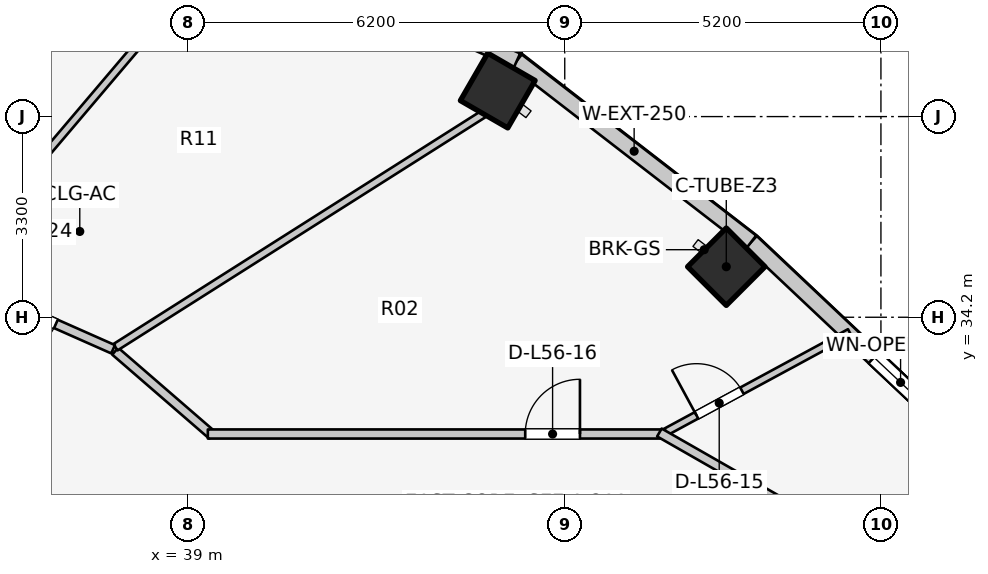
"""IFC4 building model, lengths in metres.
Left out: names, types, materials, properties, quantities, classifications, styles, units other than length and angle.
Written with IfcOpenShell. Run it as: python <this file> out.ifc"""

import sys

from ifc_helpers import new_model, si_unit, direction, frame, frame_2d, origin, origin_2d, place, context, subcontext, project, spatial, rectangle, extrude, element, fill, save


model = new_model("IFC4")
c1 = context("Model", 3, precision=1e-05, world=origin(), true_north=direction((0.0, 1.0)))
c2 = subcontext(c1, "Body", "Model", "MODEL_VIEW")
j1 = project(units=[si_unit("LENGTHUNIT", "METRE"), si_unit("PLANEANGLEUNIT", "RADIAN")], contexts=[c1])
p1 = place(None, origin())
s1 = spatial("IfcSite", under=j1, at=p1, CompositionType="ELEMENT")
p2 = place(p1, origin())
s2 = spatial("IfcBuilding", under=s1, at=p2, CompositionType="ELEMENT")
p3 = place(p2, frame((0.0, 0.0, 183.9)))
s3 = spatial("IfcBuildingStorey", under=s2, at=p3, CompositionType="ELEMENT", Elevation=183.9)
for number, where, z_axis, x_axis in (
    (1, (47.857, 35.031, 0.0), (0.0, 0.0, 1.0), (0.707, 0.707, 0.0)),
    (2, (44.098, 37.928, 0.0), (0.0, 0.0, 1.0), (0.5, 0.866, 0.0)),
):
    element("IfcColumn", number, at=place(p3, frame(where, z_axis=z_axis, x_axis=x_axis)), inside=s3, PredefinedType="COLUMN", context=c2, shape_type="SweptSolid", body=[
        extrude(rectangle(XDim=0.9, YDim=0.9, at=origin_2d()), origin(), (0.0, 0.0, 1.0), 3.1),
    ])
p4 = place(p3, frame((51.619, 32.284, 0.0), z_axis=(0.0, 0.0, 1.0), x_axis=(-0.727667301037, 0.68593024354, 0.0)))
e3 = element("IfcWall", 3, at=p4, inside=s3, PredefinedType="STANDARD", context=c2, shape_type="SweptSolid", body=[
    extrude(rectangle(XDim=4.604, YDim=0.26, at=frame_2d((2.302, 0.0))), origin(), (0.0, 0.0, 1.0), 2.85),
])
p5 = place(p4, frame((0.631, 0.0, 0.75)))
e4 = element("IfcOpeningElement", 4, at=p5, cuts=e3, PredefinedType="OPENING", context=c2, shape_type="SweptSolid", body=[
    extrude(rectangle(XDim=1.2, YDim=1.5, at=frame_2d((0.6, 0.75))), frame((0.0, 0.14, 0.0), z_axis=(0.0, -1.0, 0.0), x_axis=(1.0, 0.0, 0.0)), (0.0, 0.0, 1.0), 0.28),
])
p6 = place(p3, frame((48.269, 35.441, 0.0), z_axis=(0.0, 0.0, 1.0), x_axis=(-0.791460185804, 0.611220724687, 0.0)))
e5 = element("IfcWall", 5, at=p6, inside=s3, PredefinedType="STANDARD", context=c2, shape_type="SweptSolid", body=[
    extrude(rectangle(XDim=4.872, YDim=0.26, at=frame_2d((2.436, 0.0))), origin(), (0.0, 0.0, 1.0), 2.85),
])
p7 = place(p3, frame((44.413, 38.419, 0.0), z_axis=(0.0, 0.0, 1.0), x_axis=(-0.912353637112, 0.409403029847, 0.0)))
e6 = element("IfcWall", 6, at=p7, inside=s3, PredefinedType="STANDARD", context=c2, shape_type="SweptSolid", body=[
    extrude(rectangle(XDim=5.533, YDim=0.26, at=frame_2d((2.766, 0.0))), origin(), (0.0, 0.0, 1.0), 2.88),
])
p8 = place(p7, frame((2.167, 0.0, 0.0)))
e7 = element("IfcOpeningElement", 7, at=p8, cuts=e6, PredefinedType="OPENING", context=c2, shape_type="SweptSolid", body=[
    extrude(rectangle(XDim=1.2, YDim=2.2, at=frame_2d((0.6, 1.1))), frame((0.0, 0.14, 0.0), z_axis=(0.0, -1.0, 0.0), x_axis=(1.0, 0.0, 0.0)), (0.0, 0.0, 1.0), 0.28),
])
p9 = place(p3, frame((46.756, 32.256, 0.0), z_axis=(0.0, 0.0, 1.0), x_axis=(0.879385297668, 0.476110804587, 0.0)))
e8 = element("IfcWall", 8, at=p9, inside=s3, PredefinedType="MOVABLE", context=c2, shape_type="SweptSolid", body=[
    extrude(rectangle(XDim=3.56, YDim=0.12, at=frame_2d((1.78, 0.0))), origin(), (0.0, 0.0, 1.0), 2.22),
])
p10 = place(p9, frame((0.694, 0.0, 0.0)))
e9 = element("IfcOpeningElement", 9, at=p10, cuts=e8, PredefinedType="OPENING", context=c2, shape_type="SweptSolid", body=[
    extrude(rectangle(XDim=0.85, YDim=2.05, at=frame_2d((0.425, 1.025))), frame((0.0, 0.07, 0.0), z_axis=(0.0, -1.0, 0.0), x_axis=(1.0, 0.0, 0.0)), (0.0, 0.0, 1.0), 0.14),
])
p11 = place(p3, frame((37.807, 33.642, 0.0), z_axis=(0.0, 0.0, 1.0), x_axis=(0.756055312247, -0.654507727092, 0.0)))
e10 = element("IfcWall", 10, at=p11, inside=s3, PredefinedType="PARTITIONING", context=c2, shape_type="SweptSolid", body=[
    extrude(rectangle(XDim=2.111, YDim=0.15, at=frame_2d((1.055, 0.0))), origin(), (0.0, 0.0, 1.0), 2.299),
])
p12 = place(p3, frame((39.33, 32.28, 0.0), z_axis=(0.0, 0.0, 1.0), x_axis=(1.0, 0.0, 0.0)))
e11 = element("IfcWall", 11, at=p12, inside=s3, PredefinedType="PARTITIONING", context=c2, shape_type="SweptSolid", body=[
    extrude(rectangle(XDim=7.52, YDim=0.15, at=frame_2d((3.76, 0.0))), origin(), (0.0, 0.0, 1.0), 2.299),
])
p13 = place(p12, frame((5.22, 0.0, 0.0)))
e12 = element("IfcOpeningElement", 12, at=p13, cuts=e11, PredefinedType="OPENING", context=c2, shape_type="SweptSolid", body=[
    extrude(rectangle(XDim=0.9, YDim=2.1, at=frame_2d((0.45, 1.05))), frame((0.0, 0.085, 0.0), z_axis=(0.0, -1.0, 0.0), x_axis=(1.0, 0.0, 0.0)), (0.0, 0.0, 1.0), 0.17),
])
p14 = place(p3, frame((46.757, 32.305, 0.0), z_axis=(0.0, 0.0, 1.0), x_axis=(0.867991349648, -0.496579315857, 0.0)))
e13 = element("IfcWall", 13, at=p14, inside=s3, PredefinedType="PARTITIONING", context=c2, shape_type="SweptSolid", body=[
    extrude(rectangle(XDim=2.567, YDim=0.15, at=frame_2d((1.283, 0.0))), origin(), (0.0, 0.0, 1.0), 2.22),
])
p15 = place(p3, frame((37.812, 33.708, 0.0), z_axis=(0.0, 0.0, 1.0), x_axis=(0.844640430122, 0.535334048799, 0.0)))
e14 = element("IfcWall", 14, at=p15, inside=s3, PredefinedType="PARTITIONING", context=c2, shape_type="SweptSolid", body=[
    extrude(rectangle(XDim=7.188, YDim=0.125, at=frame_2d((3.594, 0.0))), origin(), (0.0, 0.0, 1.0), 2.299),
])
p16 = place(p3, frame((35.02, 34.952, 0.0), z_axis=(0.0, 0.0, 1.0), x_axis=(0.647173462792, 0.762342776615, 0.0)))
e15 = element("IfcWall", 15, at=p16, inside=s3, PredefinedType="PARTITIONING", context=c2, shape_type="SweptSolid", body=[
    extrude(rectangle(XDim=6.253, YDim=0.125, at=frame_2d((3.127, 0.0))), origin(), (0.0, 0.0, 1.0), 2.299),
])
p17 = place(p3, frame((37.772, 33.674, 0.0), z_axis=(0.0, 0.0, 1.0), x_axis=(-0.914324470734, 0.404982422108, 0.0)))
e16 = element("IfcWall", 16, at=p17, inside=s3, PredefinedType="PARTITIONING", context=c2, shape_type="SweptSolid", body=[
    extrude(rectangle(XDim=3.058, YDim=0.15, at=frame_2d((1.529, 0.0))), origin(), (0.0, 0.0, 1.0), 2.299),
])
p18 = place(p17, frame((1.029, 0.0, 0.0)))
e17 = element("IfcOpeningElement", 17, at=p18, cuts=e16, PredefinedType="OPENING", context=c2, shape_type="SweptSolid", body=[
    extrude(rectangle(XDim=1.0, YDim=2.1, at=frame_2d((0.5, 1.05))), frame((0.0, 0.085, 0.0), z_axis=(0.0, -1.0, 0.0), x_axis=(1.0, 0.0, 0.0)), (0.0, 0.0, 1.0), 0.17),
])
p19 = place(p5, origin())
e18 = element("IfcWindow", 18, at=p19, inside=s3, PartitioningType="SINGLE_PANEL", PredefinedType="WINDOW", context=c2, shape_type="SweptSolid", body=[
    extrude(rectangle(XDim=1.2, YDim=1.5, at=frame_2d((0.6, 0.75))), frame((0.0, 0.03, 0.0), z_axis=(0.0, -1.0, 0.0), x_axis=(1.0, 0.0, 0.0)), (0.0, 0.0, 1.0), 0.06),
])
fill(e4, e18)
p20 = place(p10, origin())
e19 = element("IfcDoor", 19, at=p20, inside=s3, OperationType="SINGLE_SWING_LEFT", PredefinedType="DOOR", context=c2, shape_type="SweptSolid", body=[
    extrude(rectangle(XDim=0.85, YDim=2.05, at=frame_2d((0.425, 1.025))), frame((0.0, 0.025, 0.0), z_axis=(0.0, -1.0, 0.0), x_axis=(1.0, 0.0, 0.0)), (0.0, 0.0, 1.0), 0.05),
])
fill(e9, e19)
p21 = place(p13, origin())
e20 = element("IfcDoor", 20, at=p21, inside=s3, OperationType="SINGLE_SWING_RIGHT", PredefinedType="DOOR", context=c2, shape_type="SweptSolid", body=[
    extrude(rectangle(XDim=0.9, YDim=2.1, at=frame_2d((0.45, 1.05))), frame((0.0, 0.025, 0.0), z_axis=(0.0, -1.0, 0.0), x_axis=(1.0, 0.0, 0.0)), (0.0, 0.0, 1.0), 0.05),
])
fill(e12, e20)
p22 = place(p18, origin())
e21 = element("IfcDoor", 21, at=p22, inside=s3, OperationType="SINGLE_SWING_RIGHT", PredefinedType="DOOR", context=c2, shape_type="SweptSolid", body=[
    extrude(rectangle(XDim=1.0, YDim=2.1, at=frame_2d((0.5, 1.05))), frame((0.0, 0.025, 0.0), z_axis=(0.0, -1.0, 0.0), x_axis=(1.0, 0.0, 0.0)), (0.0, 0.0, 1.0), 0.05),
])
fill(e17, e21)
save(model, sys.argv[1])
